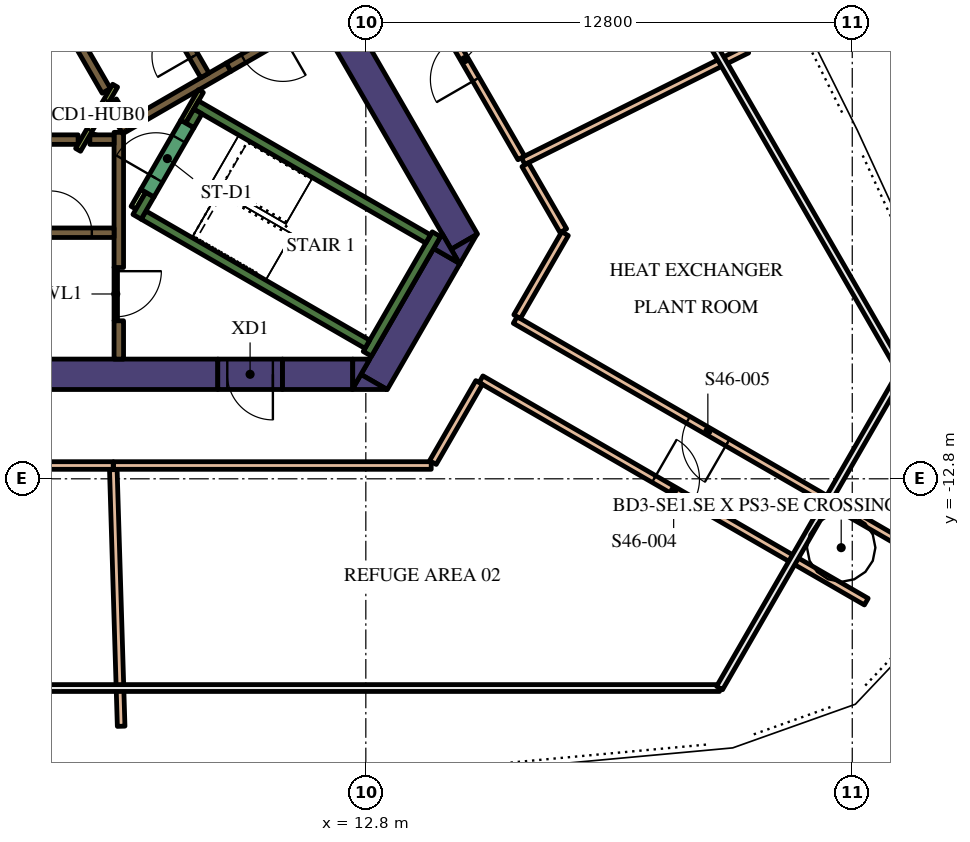
"""IFC4 building model, lengths in metres.
Left out: names, types, materials, properties, quantities, classifications, styles, units other than length and angle.
Written with IfcOpenShell. Run it as: python <this file> out.ifc"""

import sys

from ifc_helpers import new_model, si_unit, direction, frame, frame_2d, origin, place, context, subcontext, project, spatial, polyline, rectangle, outline, extrude, element, fill, save


model = new_model("IFC4")
c1 = context("Model", 3, precision=1e-05, world=origin(), true_north=direction((0.0, 1.0)))
c2 = subcontext(c1, "Body", "Model", "MODEL_VIEW")
j1 = project(units=[si_unit("LENGTHUNIT", "METRE"), si_unit("PLANEANGLEUNIT", "RADIAN")], contexts=[c1])
p1 = place(None, origin())
s1 = spatial("IfcSite", under=j1, at=p1, CompositionType="ELEMENT")
p2 = place(p1, origin())
s2 = spatial("IfcBuilding", under=s1, at=p2, CompositionType="ELEMENT")
p3 = place(p2, frame((0.0, 0.0, 196.2)))
s3 = spatial("IfcBuildingStorey", under=s2, at=p3, CompositionType="ELEMENT", Elevation=196.2)
p4 = place(p3, frame((9.129, 4.289, 0.0), z_axis=(0.0, 0.0, 1.0), x_axis=(0.499995742806, -0.866027861663, 0.0)))
e1 = element("IfcWall", 1, at=p4, inside=s3, PredefinedType="SOLIDWALL", context=c2, shape_type="SweptSolid", body=[
    extrude(rectangle(XDim=12.527, YDim=0.8, at=frame_2d((6.264, 0.0))), origin(), (0.0, 0.0, 1.0), 5.4),
])
p5 = place(p3, origin())
e2 = element("IfcWall", 2, at=p5, inside=s3, PredefinedType="SOLIDWALL", context=c2, shape_type="SweptSolid", body=[
    extrude(outline(polyline([(15.271, -7.15), (15.047, -6.762), (15.719, -6.374), (15.271, -7.15)])), origin(), (0.0, 0.0, 1.0), 5.4),
])
p6 = place(p3, frame((13.018, -10.252, 0.0), z_axis=(0.0, 0.0, 1.0), x_axis=(0.499984020225, 0.866034629516, 0.0)))
e3 = element("IfcWall", 3, at=p6, inside=s3, PredefinedType="SOLIDWALL", context=c2, shape_type="SweptSolid", body=[
    extrude(rectangle(XDim=3.824, YDim=0.8, at=frame_2d((1.912, 0.0))), origin(), (0.0, 0.0, 1.0), 5.4),
])
e4 = element("IfcWall", 4, at=p5, inside=s3, PredefinedType="SOLIDWALL", context=c2, shape_type="SweptSolid", body=[
    extrude(outline(polyline([(12.442, -10.45), (12.671, -10.053), (13.358, -10.45), (12.442, -10.45)])), origin(), (0.0, 0.0, 1.0), 5.4),
])
e5 = element("IfcWall", 5, at=p5, inside=s3, PredefinedType="SOLIDWALL", context=c2, shape_type="SweptSolid", body=[
    extrude(outline(polyline([(14.809, -6.35), (15.257, -7.126), (14.585, -6.738), (14.809, -6.35)])), origin(), (0.0, 0.0, 1.0), 5.4),
])
p7 = place(p3, frame((10.604, -10.05, 0.0), z_axis=(0.0, 0.0, 1.0), x_axis=(1.0, 0.0, 0.0)))
e6 = element("IfcWall", 6, at=p7, inside=s3, PredefinedType="SOLIDWALL", context=c2, shape_type="SweptSolid", body=[
    extrude(rectangle(XDim=1.849, YDim=0.8, at=frame_2d((0.925, 0.0))), origin(), (0.0, 0.0, 1.0), 5.4),
])
e7 = element("IfcWall", 7, at=p5, inside=s3, PredefinedType="SOLIDWALL", context=c2, shape_type="SweptSolid", body=[
    extrude(outline(polyline([(12.904, -9.65), (12.456, -10.426), (12.456, -9.65), (12.904, -9.65)])), origin(), (0.0, 0.0, 1.0), 5.4),
])
p8 = place(p3, frame((-13.378, -10.05, 0.0), z_axis=(0.0, 0.0, 1.0), x_axis=(1.0, 0.0, 0.0)))
e8 = element("IfcWall", 8, at=p8, inside=s3, PredefinedType="SOLIDWALL", context=c2, shape_type="SweptSolid", body=[
    extrude(rectangle(XDim=22.282, YDim=0.8, at=frame_2d((11.141, 0.0))), origin(), (0.0, 0.0, 1.0), 5.4),
])
p9 = place(p3, frame((12.84, -9.511, 0.0), z_axis=(0.0, 0.0, 1.0), x_axis=(0.499997733992, 0.866026712061, 0.0)))
e9 = element("IfcWall", 9, at=p9, inside=s3, PredefinedType="SOLIDWALL", context=c2, shape_type="SweptSolid", body=[
    extrude(rectangle(XDim=3.634, YDim=0.25, at=frame_2d((1.817, 0.0))), origin(), (0.0, 0.0, 1.0), 5.4),
])
p10 = place(p3, frame((12.84, -9.261, 0.0), z_axis=(0.0, 0.0, 1.0), x_axis=(-0.866013990052, 0.500019768644, 0.0)))
e10 = element("IfcWall", 10, at=p10, inside=s3, PredefinedType="SOLIDWALL", context=c2, shape_type="SweptSolid", body=[
    extrude(rectangle(XDim=6.8, YDim=0.25, at=frame_2d((3.4, 0.0))), origin(), (0.0, 0.0, 1.0), 5.4),
])
p11 = place(p3, frame((6.78, -5.906, 0.0), z_axis=(0.0, 0.0, 1.0), x_axis=(0.500223362819, 0.865896406789, 0.0)))
e11 = element("IfcWall", 11, at=p11, inside=s3, PredefinedType="SOLIDWALL", context=c2, shape_type="SweptSolid", body=[
    extrude(rectangle(XDim=0.675, YDim=0.25, at=frame_2d((0.337, 0.0))), origin(), (0.0, 0.0, 1.0), 5.4),
])
p12 = place(p3, frame((8.334, -2.964, 0.0), z_axis=(0.0, 0.0, 1.0), x_axis=(0.866016039709, -0.500016218704, 0.0)))
e12 = element("IfcWall", 12, at=p12, inside=s3, PredefinedType="SOLIDWALL", context=c2, shape_type="SweptSolid", body=[
    extrude(rectangle(XDim=7.05, YDim=0.25, at=frame_2d((3.525, 0.0))), origin(), (0.0, 0.0, 1.0), 5.4),
])
p13 = place(p3, frame((8.168, -3.503, 0.0), z_axis=(0.0, 0.0, 1.0), x_axis=(0.49972245349, 0.866185586049, 0.0)))
e13 = element("IfcWall", 13, at=p13, inside=s3, PredefinedType="SOLIDWALL", context=c2, shape_type="SweptSolid", body=[
    extrude(rectangle(XDim=0.425, YDim=0.25, at=frame_2d((0.212, 0.0))), origin(), (0.0, 0.0, 1.0), 5.4),
])
p14 = place(p3, frame((-5.259, -3.875, 0.0), z_axis=(0.0, 0.0, 1.0), x_axis=(1.0, 0.0, 0.0)))
e14 = element("IfcWall", 14, at=p14, inside=s3, PredefinedType="SOLIDWALL", context=c2, shape_type="SweptSolid", body=[
    extrude(rectangle(XDim=10.489, YDim=0.25, at=frame_2d((5.244, 0.0))), origin(), (0.0, 0.0, 1.0), 5.4),
])
p15 = place(p3, frame((6.3, -7.24, 0.0), z_axis=(0.0, 0.0, 1.0), x_axis=(0.0, 1.0, 0.0)))
e15 = element("IfcWall", 15, at=p15, inside=s3, PredefinedType="SOLIDWALL", context=c2, shape_type="SweptSolid", body=[
    extrude(rectangle(XDim=3.556, YDim=0.25, at=frame_2d((1.778, 0.0))), origin(), (0.0, 0.0, 1.0), 5.4),
])
p16 = place(p3, frame((6.3, -9.65, 0.0), z_axis=(0.0, 0.0, 1.0), x_axis=(0.0, 1.0, 0.0)))
e16 = element("IfcWall", 16, at=p16, inside=s3, PredefinedType="SOLIDWALL", context=c2, shape_type="SweptSolid", body=[
    extrude(rectangle(XDim=1.008, YDim=0.25, at=frame_2d((0.504, 0.0))), origin(), (0.0, 0.0, 1.0), 5.4),
])
p17 = place(p3, frame((5.538, -3.875, 0.0), z_axis=(0.0, 0.0, 1.0), x_axis=(1.0, 0.0, 0.0)))
e17 = element("IfcWall", 17, at=p17, inside=s3, PredefinedType="SOLIDWALL", context=c2, shape_type="SweptSolid", body=[
    extrude(rectangle(XDim=0.637, YDim=0.25, at=frame_2d((0.318, 0.0))), origin(), (0.0, 0.0, 1.0), 5.4),
])
p18 = place(p3, frame((9.19, -1.969, 0.0), z_axis=(0.0, 0.0, 1.0), x_axis=(-0.866057109641, -0.499945079824, 0.0)))
e18 = element("IfcWall", 18, at=p18, inside=s3, PredefinedType="SOLIDWALL", context=c2, shape_type="SweptSolid", body=[
    extrude(rectangle(XDim=3.291, YDim=0.25, at=frame_2d((1.646, 0.0))), origin(), (0.0, 0.0, 1.0), 5.4),
])
p19 = place(p3, frame((6.13, -2.867, 0.0), z_axis=(0.0, 0.0, 1.0), x_axis=(0.500160776593, -0.865932559475, 0.0)))
e19 = element("IfcWall", 19, at=p19, inside=s3, PredefinedType="SOLIDWALL", context=c2, shape_type="SweptSolid", body=[
    extrude(rectangle(XDim=0.627, YDim=0.25, at=frame_2d((0.313, 0.0))), origin(), (0.0, 0.0, 1.0), 5.4),
])
p20 = place(p3, frame((5.97, -2.591, 0.0), z_axis=(0.0, 0.0, 1.0), x_axis=(-0.499994469932, 0.866028596547, 0.0)))
e20 = element("IfcWall", 20, at=p20, inside=s3, PredefinedType="SOLIDWALL", context=c2, shape_type="SweptSolid", body=[
    extrude(rectangle(XDim=10.488, YDim=0.25, at=frame_2d((5.244, 0.0))), origin(), (0.0, 0.0, 1.0), 5.4),
])
p21 = place(p3, frame((6.945, -5.222, 0.0), z_axis=(0.0, 0.0, 1.0), x_axis=(-0.499818422106, -0.866130212453, 0.0)))
e21 = element("IfcWall", 21, at=p21, inside=s3, PredefinedType="PARTITIONING", context=c2, shape_type="SweptSolid", body=[
    extrude(rectangle(XDim=0.514, YDim=0.15, at=frame_2d((0.257, 0.0))), origin(), (0.0, 0.0, 1.0), 4.65),
])
p22 = place(p3, frame((8.459, -2.599, 0.0), z_axis=(0.0, 0.0, 1.0), x_axis=(-0.500041054325, -0.866001699761, 0.0)))
e22 = element("IfcWall", 22, at=p22, inside=s3, PredefinedType="PARTITIONING", context=c2, shape_type="SweptSolid", body=[
    extrude(rectangle(XDim=0.929, YDim=0.15, at=frame_2d((0.464, 0.0))), origin(), (0.0, 0.0, 1.0), 5.4),
])
p23 = place(p3, frame((-6.175, -6.325, 0.0), z_axis=(0.0, 0.0, 1.0), x_axis=(1.0, 0.0, 0.0)))
e23 = element("IfcWall", 23, at=p23, inside=s3, PredefinedType="SOLIDWALL", context=c2, shape_type="SweptSolid", body=[
    extrude(rectangle(XDim=12.35, YDim=0.25, at=frame_2d((6.175, 0.0))), origin(), (0.0, 0.0, 1.0), 5.4),
])
p24 = place(p23, frame((0.585, 0.0, 0.0)))
e24 = element("IfcOpeningElement", 24, at=p24, cuts=e23, PredefinedType="OPENING", context=c2, shape_type="SweptSolid", body=[
    extrude(rectangle(XDim=1.1, YDim=2.1, at=frame_2d((0.55, 1.05))), frame((0.0, 0.135, 0.0), z_axis=(0.0, -1.0, 0.0), x_axis=(1.0, 0.0, 0.0)), (0.0, 0.0, 1.0), 0.27),
])
p25 = place(p23, frame((3.105, 0.0, 0.0)))
e25 = element("IfcOpeningElement", 25, at=p25, cuts=e23, PredefinedType="OPENING", context=c2, shape_type="SweptSolid", body=[
    extrude(rectangle(XDim=1.1, YDim=2.1, at=frame_2d((0.55, 1.05))), frame((0.0, 0.135, 0.0), z_axis=(0.0, -1.0, 0.0), x_axis=(1.0, 0.0, 0.0)), (0.0, 0.0, 1.0), 0.27),
])
p26 = place(p23, frame((5.625, 0.0, 0.0)))
e26 = element("IfcOpeningElement", 26, at=p26, cuts=e23, PredefinedType="OPENING", context=c2, shape_type="SweptSolid", body=[
    extrude(rectangle(XDim=1.1, YDim=2.1, at=frame_2d((0.55, 1.05))), frame((0.0, 0.135, 0.0), z_axis=(0.0, -1.0, 0.0), x_axis=(1.0, 0.0, 0.0)), (0.0, 0.0, 1.0), 0.27),
])
p27 = place(p23, frame((8.145, 0.0, 0.0)))
e27 = element("IfcOpeningElement", 27, at=p27, cuts=e23, PredefinedType="OPENING", context=c2, shape_type="SweptSolid", body=[
    extrude(rectangle(XDim=1.1, YDim=2.1, at=frame_2d((0.55, 1.05))), frame((0.0, 0.135, 0.0), z_axis=(0.0, -1.0, 0.0), x_axis=(1.0, 0.0, 0.0)), (0.0, 0.0, 1.0), 0.27),
])
p28 = place(p23, frame((10.665, 0.0, 0.0)))
e28 = element("IfcOpeningElement", 28, at=p28, cuts=e23, PredefinedType="OPENING", context=c2, shape_type="SweptSolid", body=[
    extrude(rectangle(XDim=1.1, YDim=2.1, at=frame_2d((0.55, 1.05))), frame((0.0, 0.135, 0.0), z_axis=(0.0, -1.0, 0.0), x_axis=(1.0, 0.0, 0.0)), (0.0, 0.0, 1.0), 0.27),
])
p29 = place(p3, frame((8.565, -2.185, 0.0), z_axis=(0.0, 0.0, 1.0), x_axis=(-0.499997954832, 0.866026584559, 0.0)))
e29 = element("IfcWall", 29, at=p29, inside=s3, PredefinedType="SOLIDWALL", context=c2, shape_type="SweptSolid", body=[
    extrude(rectangle(XDim=12.35, YDim=0.25, at=frame_2d((6.175, 0.0))), origin(), (0.0, 0.0, 1.0), 5.4),
])
p30 = place(p29, frame((0.585, 0.0, 0.0)))
e30 = element("IfcOpeningElement", 30, at=p30, cuts=e29, PredefinedType="OPENING", context=c2, shape_type="SweptSolid", body=[
    extrude(rectangle(XDim=1.1, YDim=2.1, at=frame_2d((0.55, 1.05))), frame((0.0, 0.135, 0.0), z_axis=(0.0, -1.0, 0.0), x_axis=(1.0, 0.0, 0.0)), (0.0, 0.0, 1.0), 0.27),
])
p31 = place(p3, frame((7.053, -5.284, 0.0), z_axis=(0.0, 0.0, 1.0), x_axis=(0.500078061341, 0.865980330357, 0.0)))
e31 = element("IfcWall", 31, at=p31, inside=s3, PredefinedType="SOLIDWALL", context=c2, shape_type="SweptSolid", body=[
    extrude(rectangle(XDim=2.1, YDim=0.4, at=frame_2d((1.05, 0.0))), origin(), (0.0, 0.0, 1.0), 5.4),
])
p32 = place(p31, frame((0.45, 0.0, 0.0)))
e32 = element("IfcOpeningElement", 32, at=p32, cuts=e31, PredefinedType="OPENING", context=c2, shape_type="SweptSolid", body=[
    extrude(rectangle(XDim=1.2, YDim=2.1, at=frame_2d((0.6, 1.05))), frame((0.0, 0.21, 0.0), z_axis=(0.0, -1.0, 0.0), x_axis=(1.0, 0.0, 0.0)), (0.0, 0.0, 1.0), 0.42),
])
p33 = place(p3, frame((6.203, -2.456, 0.0), z_axis=(0.0, 0.0, 1.0), x_axis=(-0.500043961785, -0.866000020948, 0.0)))
e33 = element("IfcWall", 33, at=p33, inside=s3, PredefinedType="PARTITIONING", context=c2, shape_type="SweptSolid", body=[
    extrude(rectangle(XDim=1.95, YDim=0.15, at=frame_2d((0.975, 0.0))), origin(), (0.0, 0.0, 1.0), 5.4),
])
p34 = place(p33, frame((0.45, 0.0, 0.0)))
e34 = element("IfcOpeningElement", 34, at=p34, cuts=e33, PredefinedType="OPENING", context=c2, shape_type="SweptSolid", body=[
    extrude(rectangle(XDim=0.9, YDim=2.1, at=frame_2d((0.45, 1.05))), frame((0.0, 0.085, 0.0), z_axis=(0.0, -1.0, 0.0), x_axis=(1.0, 0.0, 0.0)), (0.0, 0.0, 1.0), 0.17),
])
p35 = place(p3, frame((6.22, -7.237, 0.0), z_axis=(0.0, 0.0, 1.0), x_axis=(0.0, -1.0, 0.0)))
e35 = element("IfcWall", 35, at=p35, inside=s3, PredefinedType="PARTITIONING", context=c2, shape_type="SweptSolid", body=[
    extrude(rectangle(XDim=1.4, YDim=0.09, at=frame_2d((0.7, 0.0))), origin(), (0.0, 0.0, 1.0), 4.65),
])
p36 = place(p35, frame((0.1, 0.0, 0.0)))
e36 = element("IfcOpeningElement", 36, at=p36, cuts=e35, PredefinedType="OPENING", context=c2, shape_type="SweptSolid", body=[
    extrude(rectangle(XDim=1.2, YDim=2.1, at=frame_2d((0.6, 1.05))), frame((0.0, 0.055, 0.0), z_axis=(0.0, -1.0, 0.0), x_axis=(1.0, 0.0, 0.0)), (0.0, 0.0, 1.0), 0.11),
])
p37 = place(p3, frame((11.009, -0.919, 0.0), z_axis=(0.0, 0.0, 1.0), x_axis=(-0.866059744384, -0.49994051562, 0.0)))
e37 = element("IfcWall", 37, at=p37, inside=s3, PredefinedType="SOLIDWALL", context=c2, shape_type="SweptSolid", body=[
    extrude(rectangle(XDim=2.1, YDim=0.25, at=frame_2d((1.05, 0.0))), origin(), (0.0, 0.0, 1.0), 5.4),
])
p38 = place(p37, frame((0.45, 0.0, 0.0)))
e38 = element("IfcOpeningElement", 38, at=p38, cuts=e37, PredefinedType="OPENING", context=c2, shape_type="SweptSolid", body=[
    extrude(rectangle(XDim=1.2, YDim=2.1, at=frame_2d((0.6, 1.05))), frame((0.0, 0.135, 0.0), z_axis=(0.0, -1.0, 0.0), x_axis=(1.0, 0.0, 0.0)), (0.0, 0.0, 1.0), 0.27),
])
p39 = place(p3, frame((10.604, -10.05, 0.0), z_axis=(0.0, 0.0, 1.0), x_axis=(-1.0, 0.0, 0.0)))
e39 = element("IfcWall", 39, at=p39, inside=s3, PredefinedType="SOLIDWALL", context=c2, shape_type="SweptSolid", body=[
    extrude(rectangle(XDim=1.7, YDim=0.8, at=frame_2d((0.85, 0.0))), origin(), (0.0, 0.0, 1.0), 5.4),
])
p40 = place(p39, frame((0.25, 0.0, 0.0)))
e40 = element("IfcOpeningElement", 40, at=p40, cuts=e39, PredefinedType="OPENING", context=c2, shape_type="SweptSolid", body=[
    extrude(rectangle(XDim=1.2, YDim=2.1, at=frame_2d((0.6, 1.05))), frame((0.0, 0.41, 0.0), z_axis=(0.0, -1.0, 0.0), x_axis=(1.0, 0.0, 0.0)), (0.0, 0.0, 1.0), 0.82),
])
p41 = place(p3, frame((-6.152, -12.45, 0.0), z_axis=(0.0, 0.0, 1.0), x_axis=(1.0, 0.0, 0.0)))
e41 = element("IfcWall", 41, at=p41, inside=s3, PredefinedType="PARTITIONING", context=c2, shape_type="SweptSolid", body=[
    extrude(rectangle(XDim=12.305, YDim=0.2, at=frame_2d((6.152, 0.0))), origin(), (0.0, 0.0, 1.0), 4.65),
])
p42 = place(p41, frame((5.552, 0.0, 0.0)))
e42 = element("IfcOpeningElement", 42, at=p42, cuts=e41, PredefinedType="OPENING", context=c2, shape_type="SweptSolid", body=[
    extrude(rectangle(XDim=1.2, YDim=2.1, at=frame_2d((0.6, 1.05))), frame((0.0, 0.11, 0.0), z_axis=(0.0, -1.0, 0.0), x_axis=(1.0, 0.0, 0.0)), (0.0, 0.0, 1.0), 0.22),
])
p43 = place(p3, frame((26.869, -14.474, 0.0), z_axis=(0.0, 0.0, 1.0), x_axis=(-0.866029647556, 0.4999926495, 0.0)))
e43 = element("IfcWall", 43, at=p43, inside=s3, PredefinedType="PARTITIONING", context=c2, shape_type="SweptSolid", body=[
    extrude(rectangle(XDim=11.706, YDim=0.2, at=frame_2d((5.853, 0.0))), origin(), (0.0, 0.0, 1.0), 4.65),
])
p44 = place(p43, frame((5.253, 0.0, 0.0)))
e44 = element("IfcOpeningElement", 44, at=p44, cuts=e43, PredefinedType="OPENING", context=c2, shape_type="SweptSolid", body=[
    extrude(rectangle(XDim=1.2, YDim=2.1, at=frame_2d((0.6, 1.05))), frame((0.0, 0.11, 0.0), z_axis=(0.0, -1.0, 0.0), x_axis=(1.0, 0.0, 0.0)), (0.0, 0.0, 1.0), 0.22),
])
p45 = place(p3, frame((15.831, -10.179, 0.0), z_axis=(0.0, 0.0, 1.0), x_axis=(0.866024433663, -0.500001680296, 0.0)))
e45 = element("IfcWall", 45, at=p45, inside=s3, PredefinedType="PARTITIONING", context=c2, shape_type="SweptSolid", body=[
    extrude(rectangle(XDim=11.706, YDim=0.2, at=frame_2d((5.853, 0.0))), origin(), (0.0, 0.0, 1.0), 4.65),
])
p46 = place(p45, frame((5.253, 0.0, 0.0)))
e46 = element("IfcOpeningElement", 46, at=p46, cuts=e45, PredefinedType="OPENING", context=c2, shape_type="SweptSolid", body=[
    extrude(rectangle(XDim=1.2, YDim=2.1, at=frame_2d((0.6, 1.05))), frame((0.0, 0.11, 0.0), z_axis=(0.0, -1.0, 0.0), x_axis=(1.0, 0.0, 0.0)), (0.0, 0.0, 1.0), 0.22),
])
p47 = place(p3, frame((14.521, -12.45, 0.0), z_axis=(0.0, 0.0, 1.0), x_axis=(-1.0, 0.0, 0.0)))
e47 = element("IfcWall", 47, at=p47, inside=s3, PredefinedType="PARTITIONING", context=c2, shape_type="SweptSolid", body=[
    extrude(rectangle(XDim=8.359, YDim=0.2, at=frame_2d((4.179, 0.0))), origin(), (0.0, 0.0, 1.0), 4.65),
])
p48 = place(p3, frame((6.156, -12.56, 0.0), z_axis=(0.0, 0.0, 1.0), x_axis=(0.030506894933, -0.999534556362, 0.0)))
e48 = element("IfcWall", 48, at=p48, inside=s3, PredefinedType="PARTITIONING", context=c2, shape_type="SweptSolid", body=[
    extrude(rectangle(XDim=6.754, YDim=0.2, at=frame_2d((3.377, 0.0))), origin(), (0.0, 0.0, 1.0), 4.65),
])
p49 = place(p3, frame((16.94, -4.441, 0.0), z_axis=(0.0, 0.0, 1.0), x_axis=(0.894923674163, 0.446219248153, 0.0)))
e49 = element("IfcWall", 49, at=p49, inside=s3, PredefinedType="PARTITIONING", context=c2, shape_type="SweptSolid", body=[
    extrude(rectangle(XDim=6.582, YDim=0.2, at=frame_2d((3.291, 0.0))), origin(), (0.0, 0.0, 1.0), 4.65),
])
p50 = place(p3, frame((16.89, -4.354, 0.0), z_axis=(0.0, 0.0, 1.0), x_axis=(-0.500004760619, 0.866022655223, 0.0)))
e50 = element("IfcWall", 50, at=p50, inside=s3, PredefinedType="PARTITIONING", context=c2, shape_type="SweptSolid", body=[
    extrude(rectangle(XDim=5.964, YDim=0.2, at=frame_2d((2.982, 0.0))), origin(), (0.0, 0.0, 1.0), 4.65),
])
p51 = place(p50, frame((2.382, 0.0, 0.0)))
e51 = element("IfcOpeningElement", 51, at=p51, cuts=e50, PredefinedType="OPENING", context=c2, shape_type="SweptSolid", body=[
    extrude(rectangle(XDim=1.2, YDim=2.1, at=frame_2d((0.6, 1.05))), frame((0.0, 0.11, 0.0), z_axis=(0.0, -1.0, 0.0), x_axis=(1.0, 0.0, 0.0)), (0.0, 0.0, 1.0), 0.22),
])
p52 = place(p3, frame((18.042, -6.35, 0.0), z_axis=(0.0, 0.0, 1.0), x_axis=(-0.500043699366, -0.866000172474, 0.0)))
e52 = element("IfcWall", 52, at=p52, inside=s3, PredefinedType="PARTITIONING", context=c2, shape_type="SweptSolid", body=[
    extrude(rectangle(XDim=2.522, YDim=0.2, at=frame_2d((1.261, 0.0))), origin(), (0.0, 0.0, 1.0), 4.65),
])
p53 = place(p3, frame((15.781, -10.266, 0.0), z_axis=(0.0, 0.0, 1.0), x_axis=(-0.499983176524, -0.866035116605, 0.0)))
e53 = element("IfcWall", 53, at=p53, inside=s3, PredefinedType="PARTITIONING", context=c2, shape_type="SweptSolid", body=[
    extrude(rectangle(XDim=2.432, YDim=0.2, at=frame_2d((1.216, 0.0))), origin(), (0.0, 0.0, 1.0), 4.65),
])
p54 = place(p3, frame((16.995, -4.536, 0.0), z_axis=(0.0, 0.0, 1.0), x_axis=(0.499989486807, -0.866031473494, 0.0)))
e54 = element("IfcWall", 54, at=p54, inside=s3, PredefinedType="PARTITIONING", context=c2, shape_type="SweptSolid", body=[
    extrude(rectangle(XDim=2.005, YDim=0.2, at=frame_2d((1.002, 0.0))), origin(), (0.0, 0.0, 1.0), 4.65),
])
p55 = place(p28, origin())
e55 = element("IfcDoor", 55, at=p55, inside=s3, OperationType="DOUBLE_DOOR_SLIDING", PredefinedType="DOOR", context=c2, shape_type="SweptSolid", body=[
    extrude(rectangle(XDim=1.1, YDim=2.1, at=frame_2d((0.55, 1.05))), frame((0.0, 0.025, 0.0), z_axis=(0.0, -1.0, 0.0), x_axis=(1.0, 0.0, 0.0)), (0.0, 0.0, 1.0), 0.05),
])
fill(e28, e55)
p56 = place(p30, origin())
e56 = element("IfcDoor", 56, at=p56, inside=s3, OperationType="DOUBLE_DOOR_SLIDING", PredefinedType="DOOR", context=c2, shape_type="SweptSolid", body=[
    extrude(rectangle(XDim=1.1, YDim=2.1, at=frame_2d((0.55, 1.05))), frame((0.0, 0.025, 0.0), z_axis=(0.0, -1.0, 0.0), x_axis=(1.0, 0.0, 0.0)), (0.0, 0.0, 1.0), 0.05),
])
fill(e30, e56)
p57 = place(p32, origin())
e57 = element("IfcDoor", 57, at=p57, inside=s3, OperationType="SINGLE_SWING_LEFT", PredefinedType="DOOR", context=c2, shape_type="SweptSolid", body=[
    extrude(rectangle(XDim=1.2, YDim=2.1, at=frame_2d((0.6, 1.05))), frame((0.0, 0.025, 0.0), z_axis=(0.0, -1.0, 0.0), x_axis=(1.0, 0.0, 0.0)), (0.0, 0.0, 1.0), 0.05),
])
fill(e32, e57)
p58 = place(p34, origin())
e58 = element("IfcDoor", 58, at=p58, inside=s3, OperationType="SINGLE_SWING_LEFT", PredefinedType="DOOR", context=c2, shape_type="SweptSolid", body=[
    extrude(rectangle(XDim=0.9, YDim=2.1, at=frame_2d((0.45, 1.05))), frame((0.0, 0.025, 0.0), z_axis=(0.0, -1.0, 0.0), x_axis=(1.0, 0.0, 0.0)), (0.0, 0.0, 1.0), 0.05),
])
fill(e34, e58)
p59 = place(p36, origin())
e59 = element("IfcDoor", 59, at=p59, inside=s3, OperationType="SINGLE_SWING_LEFT", PredefinedType="DOOR", context=c2, shape_type="SweptSolid", body=[
    extrude(rectangle(XDim=1.2, YDim=2.1, at=frame_2d((0.6, 1.05))), frame((0.0, 0.025, 0.0), z_axis=(0.0, -1.0, 0.0), x_axis=(1.0, 0.0, 0.0)), (0.0, 0.0, 1.0), 0.05),
])
fill(e36, e59)
p60 = place(p38, origin())
e60 = element("IfcDoor", 60, at=p60, inside=s3, OperationType="SINGLE_SWING_LEFT", PredefinedType="DOOR", context=c2, shape_type="SweptSolid", body=[
    extrude(rectangle(XDim=1.2, YDim=2.1, at=frame_2d((0.6, 1.05))), frame((0.0, 0.025, 0.0), z_axis=(0.0, -1.0, 0.0), x_axis=(1.0, 0.0, 0.0)), (0.0, 0.0, 1.0), 0.05),
])
fill(e38, e60)
p61 = place(p40, origin())
e61 = element("IfcDoor", 61, at=p61, inside=s3, OperationType="SINGLE_SWING_LEFT", PredefinedType="DOOR", context=c2, shape_type="SweptSolid", body=[
    extrude(rectangle(XDim=1.2, YDim=2.1, at=frame_2d((0.6, 1.05))), frame((0.0, 0.025, 0.0), z_axis=(0.0, -1.0, 0.0), x_axis=(1.0, 0.0, 0.0)), (0.0, 0.0, 1.0), 0.05),
])
fill(e40, e61)
p62 = place(p46, origin())
e62 = element("IfcDoor", 62, at=p62, inside=s3, OperationType="SINGLE_SWING_RIGHT", PredefinedType="DOOR", context=c2, shape_type="SweptSolid", body=[
    extrude(rectangle(XDim=1.2, YDim=2.1, at=frame_2d((0.6, 1.05))), frame((0.0, 0.025, 0.0), z_axis=(0.0, -1.0, 0.0), x_axis=(1.0, 0.0, 0.0)), (0.0, 0.0, 1.0), 0.05),
])
fill(e46, e62)
p63 = place(p44, origin())
e63 = element("IfcDoor", 63, at=p63, inside=s3, OperationType="SINGLE_SWING_RIGHT", PredefinedType="DOOR", context=c2, shape_type="SweptSolid", body=[
    extrude(rectangle(XDim=1.2, YDim=2.1, at=frame_2d((0.6, 1.05))), frame((0.0, 0.025, 0.0), z_axis=(0.0, -1.0, 0.0), x_axis=(1.0, 0.0, 0.0)), (0.0, 0.0, 1.0), 0.05),
])
fill(e44, e63)
p64 = place(p51, origin())
e64 = element("IfcDoor", 64, at=p64, inside=s3, OperationType="SINGLE_SWING_RIGHT", PredefinedType="DOOR", context=c2, shape_type="SweptSolid", body=[
    extrude(rectangle(XDim=1.2, YDim=2.1, at=frame_2d((0.6, 1.05))), frame((0.0, 0.025, 0.0), z_axis=(0.0, -1.0, 0.0), x_axis=(1.0, 0.0, 0.0)), (0.0, 0.0, 1.0), 0.05),
])
fill(e51, e64)
save(model, sys.argv[1])
